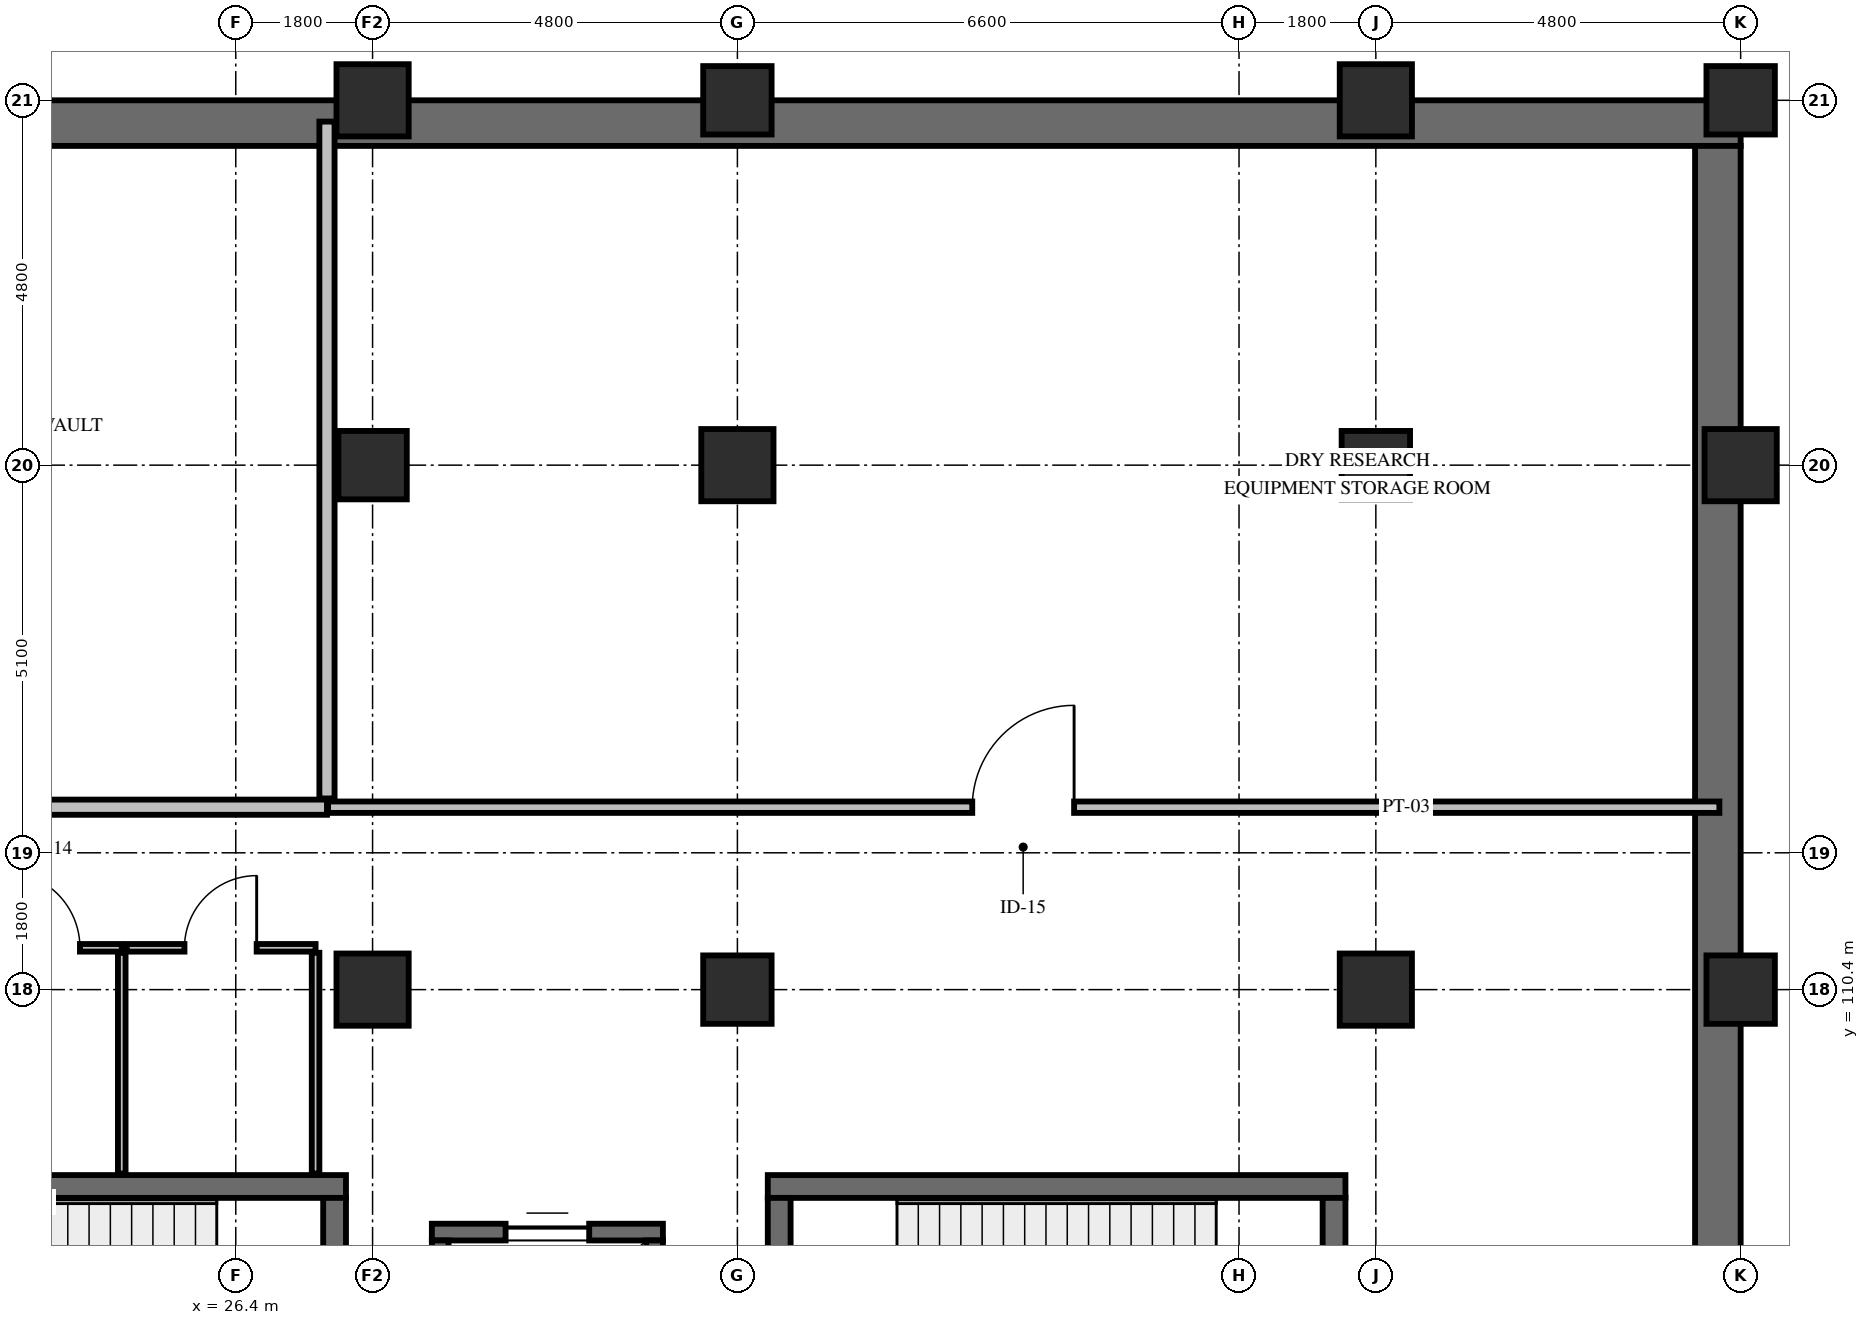
"""IFC4 building model, lengths in metres.
Left out: names, types, materials, properties, quantities, classifications, styles, units other than length and angle.
Written with IfcOpenShell. Run it as: python <this file> out.ifc"""

import sys

from ifc_helpers import new_model, si_unit, direction, frame, frame_2d, origin, origin_2d, place, context, subcontext, project, spatial, rectangle, extrude, element, fill, save


model = new_model("IFC4")
c1 = context("Model", 3, precision=1e-05, world=origin(), true_north=direction((0.0, 1.0)))
c2 = subcontext(c1, "Body", "Model", "MODEL_VIEW")
j1 = project(units=[si_unit("LENGTHUNIT", "METRE"), si_unit("PLANEANGLEUNIT", "RADIAN")], contexts=[c1])
p1 = place(None, origin())
s1 = spatial("IfcSite", under=j1, at=p1, CompositionType="ELEMENT")
p2 = place(p1, origin())
s2 = spatial("IfcBuilding", under=s1, at=p2, CompositionType="ELEMENT")
p3 = place(p2, frame((0.0, 0.0, -5.4)))
s3 = spatial("IfcBuildingStorey", under=s2, at=p3, CompositionType="ELEMENT", Elevation=-5.4)
p4 = place(p3, frame((0.0, 121.8, 0.0), z_axis=(0.0, 0.0, 1.0), x_axis=(1.0, 0.0, 0.0)))
e1 = element("IfcWall", 1, at=p4, inside=s3, PredefinedType="USERDEFINED", context=c2, shape_type="SweptSolid", body=[
    extrude(rectangle(XDim=46.2, YDim=0.6, at=frame_2d((23.1, 0.0))), origin(), (0.0, 0.0, 1.0), 4.96),
])
p5 = place(p3, frame((45.9, 99.6, 0.0), z_axis=(0.0, 0.0, 1.0), x_axis=(0.0, 1.0, 0.0)))
e2 = element("IfcWall", 2, at=p5, inside=s3, PredefinedType="USERDEFINED", context=c2, shape_type="SweptSolid", body=[
    extrude(rectangle(XDim=21.9, YDim=0.6, at=frame_2d((10.95, 0.0))), origin(), (0.0, 0.0, 1.0), 4.96),
])
p6 = place(p3, frame((28.2, 110.4, 0.0), z_axis=(0.0, 0.0, 1.0), x_axis=(1.0, 0.0, 0.0)))
e3 = element("IfcColumn", 3, at=p6, inside=s3, PredefinedType="COLUMN", context=c2, shape_type="SweptSolid", body=[
    extrude(rectangle(XDim=0.95, YDim=0.95, at=origin_2d()), origin(), (0.0, 0.0, 1.0), 5.4),
])
p7 = place(p3, frame((28.2, 117.3, 0.0), z_axis=(0.0, 0.0, 1.0), x_axis=(1.0, 0.0, 0.0)))
e4 = element("IfcColumn", 4, at=p7, inside=s3, PredefinedType="COLUMN", context=c2, shape_type="SweptSolid", body=[
    extrude(rectangle(XDim=0.9, YDim=0.9, at=origin_2d()), origin(), (0.0, 0.0, 1.0), 5.4),
])
p8 = place(p3, frame((28.2, 122.1, 0.0), z_axis=(0.0, 0.0, 1.0), x_axis=(1.0, 0.0, 0.0)))
e5 = element("IfcColumn", 5, at=p8, inside=s3, PredefinedType="COLUMN", context=c2, shape_type="SweptSolid", body=[
    extrude(rectangle(XDim=0.95, YDim=0.95, at=origin_2d()), origin(), (0.0, 0.0, 1.0), 5.4),
])
p9 = place(p3, frame((33.0, 110.4, 0.0), z_axis=(0.0, 0.0, 1.0), x_axis=(1.0, 0.0, 0.0)))
e6 = element("IfcColumn", 6, at=p9, inside=s3, PredefinedType="COLUMN", context=c2, shape_type="SweptSolid", body=[
    extrude(rectangle(XDim=0.9, YDim=0.9, at=origin_2d()), origin(), (0.0, 0.0, 1.0), 5.4),
])
p10 = place(p3, frame((33.0, 117.3, 0.0), z_axis=(0.0, 0.0, 1.0), x_axis=(1.0, 0.0, 0.0)))
e7 = element("IfcColumn", 7, at=p10, inside=s3, PredefinedType="COLUMN", context=c2, shape_type="SweptSolid", body=[
    extrude(rectangle(XDim=0.95, YDim=0.95, at=origin_2d()), origin(), (0.0, 0.0, 1.0), 5.4),
])
p11 = place(p3, frame((33.0, 122.1, 0.0), z_axis=(0.0, 0.0, 1.0), x_axis=(1.0, 0.0, 0.0)))
e8 = element("IfcColumn", 8, at=p11, inside=s3, PredefinedType="COLUMN", context=c2, shape_type="SweptSolid", body=[
    extrude(rectangle(XDim=0.9, YDim=0.9, at=origin_2d()), origin(), (0.0, 0.0, 1.0), 5.4),
])
p12 = place(p3, frame((41.4, 110.4, 0.0), z_axis=(0.0, 0.0, 1.0), x_axis=(1.0, 0.0, 0.0)))
e9 = element("IfcColumn", 9, at=p12, inside=s3, PredefinedType="COLUMN", context=c2, shape_type="SweptSolid", body=[
    extrude(rectangle(XDim=0.95, YDim=0.95, at=origin_2d()), origin(), (0.0, 0.0, 1.0), 5.4),
])
p13 = place(p3, frame((41.4, 117.3, 0.0), z_axis=(0.0, 0.0, 1.0), x_axis=(1.0, 0.0, 0.0)))
e10 = element("IfcColumn", 10, at=p13, inside=s3, PredefinedType="COLUMN", context=c2, shape_type="SweptSolid", body=[
    extrude(rectangle(XDim=0.9, YDim=0.9, at=origin_2d()), origin(), (0.0, 0.0, 1.0), 5.4),
])
p14 = place(p3, frame((41.4, 122.1, 0.0), z_axis=(0.0, 0.0, 1.0), x_axis=(1.0, 0.0, 0.0)))
e11 = element("IfcColumn", 11, at=p14, inside=s3, PredefinedType="COLUMN", context=c2, shape_type="SweptSolid", body=[
    extrude(rectangle(XDim=0.95, YDim=0.95, at=origin_2d()), origin(), (0.0, 0.0, 1.0), 5.4),
])
p15 = place(p3, frame((46.2, 110.4, 0.0), z_axis=(0.0, 0.0, 1.0), x_axis=(1.0, 0.0, 0.0)))
e12 = element("IfcColumn", 12, at=p15, inside=s3, PredefinedType="COLUMN", context=c2, shape_type="SweptSolid", body=[
    extrude(rectangle(XDim=0.9, YDim=0.9, at=origin_2d()), origin(), (0.0, 0.0, 1.0), 5.4),
])
p16 = place(p3, frame((46.2, 117.3, 0.0), z_axis=(0.0, 0.0, 1.0), x_axis=(1.0, 0.0, 0.0)))
e13 = element("IfcColumn", 13, at=p16, inside=s3, PredefinedType="COLUMN", context=c2, shape_type="SweptSolid", body=[
    extrude(rectangle(XDim=0.95, YDim=0.95, at=origin_2d()), origin(), (0.0, 0.0, 1.0), 5.4),
])
p17 = place(p3, frame((46.2, 122.1, 0.0), z_axis=(0.0, 0.0, 1.0), x_axis=(1.0, 0.0, 0.0)))
e14 = element("IfcColumn", 14, at=p17, inside=s3, PredefinedType="COLUMN", context=c2, shape_type="SweptSolid", body=[
    extrude(rectangle(XDim=0.9, YDim=0.9, at=origin_2d()), origin(), (0.0, 0.0, 1.0), 5.4),
])
p18 = place(p3, frame((20.25, 107.81, 0.0), z_axis=(0.0, 0.0, 1.0), x_axis=(1.0, 0.0, 0.0)))
e15 = element("IfcWall", 15, at=p18, inside=s3, PredefinedType="SHEAR", context=c2, shape_type="SweptSolid", body=[
    extrude(rectangle(XDim=7.6, YDim=0.3, at=frame_2d((3.8, 0.0))), origin(), (0.0, 0.0, 1.0), 4.98),
])
p19 = place(p3, frame((27.7, 104.7, 0.0), z_axis=(0.0, 0.0, 1.0), x_axis=(0.0, 1.0, 0.0)))
e16 = element("IfcWall", 16, at=p19, inside=s3, PredefinedType="SHEAR", context=c2, shape_type="SweptSolid", body=[
    extrude(rectangle(XDim=2.96, YDim=0.3, at=frame_2d((1.48, 0.0))), origin(), (0.0, 0.0, 1.0), 4.98),
])
p20 = place(p3, frame((33.4, 107.81, 0.0), z_axis=(0.0, 0.0, 1.0), x_axis=(1.0, 0.0, 0.0)))
e17 = element("IfcWall", 17, at=p20, inside=s3, PredefinedType="SHEAR", context=c2, shape_type="SweptSolid", body=[
    extrude(rectangle(XDim=7.6, YDim=0.3, at=frame_2d((3.8, 0.0))), origin(), (0.0, 0.0, 1.0), 4.98),
])
p21 = place(p3, frame((33.55, 104.7, 0.0), z_axis=(0.0, 0.0, 1.0), x_axis=(0.0, 1.0, 0.0)))
e18 = element("IfcWall", 18, at=p21, inside=s3, PredefinedType="SHEAR", context=c2, shape_type="SweptSolid", body=[
    extrude(rectangle(XDim=2.96, YDim=0.3, at=frame_2d((1.48, 0.0))), origin(), (0.0, 0.0, 1.0), 4.98),
])
p22 = place(p21, frame((0.94, 0.0, 0.0)))
e19 = element("IfcOpeningElement", 19, at=p22, cuts=e18, PredefinedType="OPENING", context=c2, shape_type="SweptSolid", body=[
    extrude(rectangle(XDim=1.08, YDim=2.2, at=frame_2d((0.54, 1.1))), frame((0.0, 0.165, 0.0), z_axis=(0.0, -1.0, 0.0), x_axis=(1.0, 0.0, 0.0)), (0.0, 0.0, 1.0), 0.33),
])
p23 = place(p3, frame((40.85, 104.7, 0.0), z_axis=(0.0, 0.0, 1.0), x_axis=(0.0, 1.0, 0.0)))
e20 = element("IfcWall", 20, at=p23, inside=s3, PredefinedType="SHEAR", context=c2, shape_type="SweptSolid", body=[
    extrude(rectangle(XDim=2.96, YDim=0.3, at=frame_2d((1.48, 0.0))), origin(), (0.0, 0.0, 1.0), 4.98),
])
p24 = place(p3, frame((28.98, 107.21, 0.0), z_axis=(0.0, 0.0, 1.0), x_axis=(1.0, 0.0, 0.0)))
e21 = element("IfcWall", 21, at=p24, inside=s3, PredefinedType="SHEAR", context=c2, shape_type="SweptSolid", body=[
    extrude(rectangle(XDim=3.04, YDim=0.22, at=frame_2d((1.52, 0.0))), origin(), (0.0, 0.0, 1.0), 4.98),
])
p25 = place(p24, frame((0.97, 0.0, 0.0)))
e22 = element("IfcOpeningElement", 22, at=p25, cuts=e21, PredefinedType="OPENING", context=c2, shape_type="SweptSolid", body=[
    extrude(rectangle(XDim=1.1, YDim=2.2, at=frame_2d((0.55, 1.1))), frame((0.0, 0.125, 0.0), z_axis=(0.0, -1.0, 0.0), x_axis=(1.0, 0.0, 0.0)), (0.0, 0.0, 1.0), 0.25),
])
for number, where, z_axis, x_axis in (
    (23, (29.09, 104.7, 0.0), (0.0, 0.0, 1.0), (0.0, 1.0, 0.0)),
    (24, (31.91, 104.7, 0.0), (0.0, 0.0, 1.0), (0.0, 1.0, 0.0)),
):
    element("IfcWall", number, at=place(p3, frame(where, z_axis=z_axis, x_axis=x_axis)), inside=s3, PredefinedType="SHEAR", context=c2, shape_type="SweptSolid", body=[
        extrude(rectangle(XDim=2.4, YDim=0.22, at=frame_2d((1.2, 0.0))), origin(), (0.0, 0.0, 1.0), 4.98),
    ])
p26 = place(p3, frame((22.815, 110.95, 0.0), z_axis=(0.0, 0.0, 1.0), x_axis=(1.0, 0.0, 0.0)))
e25 = element("IfcWall", 25, at=p26, inside=s3, PredefinedType="PARTITIONING", context=c2, shape_type="SweptSolid", body=[
    extrude(rectangle(XDim=2.085, YDim=0.1, at=frame_2d((1.042, 0.0))), origin(), (0.0, 0.0, 1.0), 4.96),
])
p27 = place(p26, frame((0.535, 0.0, 0.0)))
e26 = element("IfcOpeningElement", 26, at=p27, cuts=e25, PredefinedType="OPENING", context=c2, shape_type="SweptSolid", body=[
    extrude(rectangle(XDim=1.0, YDim=2.15, at=frame_2d((0.5, 1.075))), frame((0.0, 0.065, 0.0), z_axis=(0.0, -1.0, 0.0), x_axis=(1.0, 0.0, 0.0)), (0.0, 0.0, 1.0), 0.13),
])
p28 = place(p3, frame((24.9, 107.98, 0.0), z_axis=(0.0, 0.0, 1.0), x_axis=(0.0, 1.0, 0.0)))
e27 = element("IfcWall", 27, at=p28, inside=s3, PredefinedType="PARTITIONING", context=c2, shape_type="SweptSolid", body=[
    extrude(rectangle(XDim=2.905, YDim=0.1, at=frame_2d((1.453, 0.0))), origin(), (0.0, 0.0, 1.0), 4.43),
])
p29 = place(p3, frame((24.965, 110.95, 0.0), z_axis=(0.0, 0.0, 1.0), x_axis=(1.0, 0.0, 0.0)))
e28 = element("IfcWall", 28, at=p29, inside=s3, PredefinedType="PARTITIONING", context=c2, shape_type="SweptSolid", body=[
    extrude(rectangle(XDim=2.485, YDim=0.1, at=frame_2d((1.242, 0.0))), origin(), (0.0, 0.0, 1.0), 4.895),
])
p30 = place(p29, frame((0.76, 0.0, 0.0)))
e29 = element("IfcOpeningElement", 29, at=p30, cuts=e28, PredefinedType="OPENING", context=c2, shape_type="SweptSolid", body=[
    extrude(rectangle(XDim=0.95, YDim=2.15, at=frame_2d((0.475, 1.075))), frame((0.0, 0.065, 0.0), z_axis=(0.0, -1.0, 0.0), x_axis=(1.0, 0.0, 0.0)), (0.0, 0.0, 1.0), 0.13),
])
p31 = place(p3, frame((27.45, 107.98, 0.0), z_axis=(0.0, 0.0, 1.0), x_axis=(0.0, 1.0, 0.0)))
e30 = element("IfcWall", 30, at=p31, inside=s3, PredefinedType="PARTITIONING", context=c2, shape_type="SweptSolid", body=[
    extrude(rectangle(XDim=2.905, YDim=0.1, at=frame_2d((1.453, 0.0))), origin(), (0.0, 0.0, 1.0), 4.43),
])
p32 = place(p3, frame((16.615, 112.8, 0.0), z_axis=(0.0, 0.0, 1.0), x_axis=(1.0, 0.0, 0.0)))
e31 = element("IfcWall", 31, at=p32, inside=s3, PredefinedType="PARTITIONING", context=c2, shape_type="SweptSolid", body=[
    extrude(rectangle(XDim=10.985, YDim=0.2, at=frame_2d((5.493, 0.0))), origin(), (0.0, 0.0, 1.0), 4.73),
])
p33 = place(p32, frame((4.555, 0.0, 0.0)))
e32 = element("IfcOpeningElement", 32, at=p33, cuts=e31, PredefinedType="OPENING", context=c2, shape_type="SweptSolid", body=[
    extrude(rectangle(XDim=1.76, YDim=2.35, at=frame_2d((0.88, 1.175))), frame((0.0, 0.115, 0.0), z_axis=(0.0, -1.0, 0.0), x_axis=(1.0, 0.0, 0.0)), (0.0, 0.0, 1.0), 0.23),
])
p34 = place(p3, frame((27.6, 112.915, 0.0), z_axis=(0.0, 0.0, 1.0), x_axis=(0.0, 1.0, 0.0)))
e33 = element("IfcWall", 33, at=p34, inside=s3, PredefinedType="PARTITIONING", context=c2, shape_type="SweptSolid", body=[
    extrude(rectangle(XDim=8.905, YDim=0.2, at=frame_2d((4.453, 0.0))), origin(), (0.0, 0.0, 1.0), 4.43),
])
p35 = place(p3, frame((27.615, 112.8, 0.0), z_axis=(0.0, 0.0, 1.0), x_axis=(1.0, 0.0, 0.0)))
e34 = element("IfcWall", 34, at=p35, inside=s3, PredefinedType="PARTITIONING", context=c2, shape_type="SweptSolid", body=[
    extrude(rectangle(XDim=18.305, YDim=0.15, at=frame_2d((9.152, 0.0))), origin(), (0.0, 0.0, 1.0), 4.73),
])
p36 = place(p35, frame((8.475, 0.0, 0.0)))
e35 = element("IfcOpeningElement", 35, at=p36, cuts=e34, PredefinedType="OPENING", context=c2, shape_type="SweptSolid", body=[
    extrude(rectangle(XDim=1.34, YDim=2.2, at=frame_2d((0.67, 1.1))), frame((0.0, 0.09, 0.0), z_axis=(0.0, -1.0, 0.0), x_axis=(1.0, 0.0, 0.0)), (0.0, 0.0, 1.0), 0.18),
])
p37 = place(p25, origin())
e36 = element("IfcDoor", 36, at=p37, inside=s3, OperationType="SLIDING_TO_LEFT", PredefinedType="DOOR", context=c2, shape_type="SweptSolid", body=[
    extrude(rectangle(XDim=1.1, YDim=2.2, at=frame_2d((0.55, 1.1))), frame((0.0, 0.025, 0.0), z_axis=(0.0, -1.0, 0.0), x_axis=(1.0, 0.0, 0.0)), (0.0, 0.0, 1.0), 0.05),
])
fill(e22, e36)
p38 = place(p27, origin())
e37 = element("IfcDoor", 37, at=p38, inside=s3, OperationType="SINGLE_SWING_LEFT", PredefinedType="DOOR", context=c2, shape_type="SweptSolid", body=[
    extrude(rectangle(XDim=1.0, YDim=2.15, at=frame_2d((0.5, 1.075))), frame((0.0, 0.025, 0.0), z_axis=(0.0, -1.0, 0.0), x_axis=(1.0, 0.0, 0.0)), (0.0, 0.0, 1.0), 0.05),
])
fill(e26, e37)
p39 = place(p30, origin())
e38 = element("IfcDoor", 38, at=p39, inside=s3, OperationType="SINGLE_SWING_RIGHT", PredefinedType="DOOR", context=c2, shape_type="SweptSolid", body=[
    extrude(rectangle(XDim=0.95, YDim=2.15, at=frame_2d((0.475, 1.075))), frame((0.0, 0.025, 0.0), z_axis=(0.0, -1.0, 0.0), x_axis=(1.0, 0.0, 0.0)), (0.0, 0.0, 1.0), 0.05),
])
fill(e29, e38)
p40 = place(p36, origin())
e39 = element("IfcDoor", 39, at=p40, inside=s3, OperationType="SINGLE_SWING_RIGHT", PredefinedType="DOOR", context=c2, shape_type="SweptSolid", body=[
    extrude(rectangle(XDim=1.34, YDim=2.2, at=frame_2d((0.67, 1.1))), frame((0.0, 0.025, 0.0), z_axis=(0.0, -1.0, 0.0), x_axis=(1.0, 0.0, 0.0)), (0.0, 0.0, 1.0), 0.05),
])
fill(e35, e39)
save(model, sys.argv[1])
